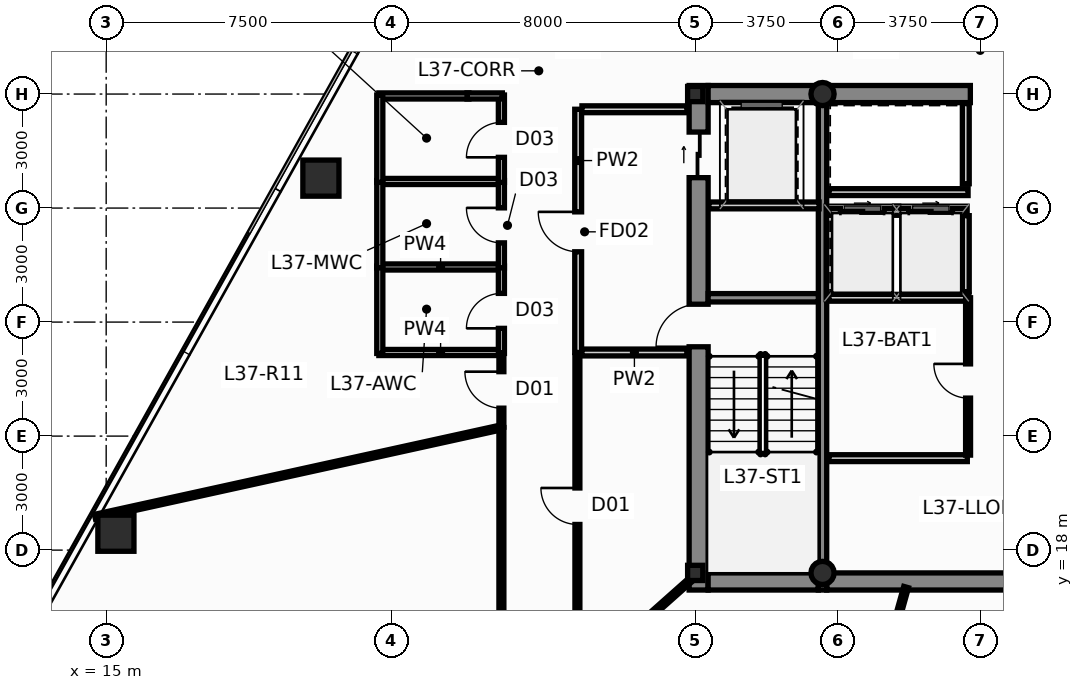
"""IFC4 building model, lengths in metres.
Left out: names, types, materials, properties, quantities, classifications, styles, units other than length and angle.
Written with IfcOpenShell. Run it as: python <this file> out.ifc"""

import sys

from ifc_helpers import new_model, si_unit, direction, frame, frame_2d, origin, origin_2d, place, context, subcontext, project, spatial, rectangle, hollow_rectangle, hollow_circle, i_section, extrude, source, transform, mapped, element, fill, save


model = new_model("IFC4")
c1 = context("Model", 3, precision=1e-05, world=origin(), true_north=direction((0.0, 1.0)))
c2 = subcontext(c1, "Body", "Model", "MODEL_VIEW")
j1 = project(units=[si_unit("LENGTHUNIT", "METRE"), si_unit("PLANEANGLEUNIT", "RADIAN")], contexts=[c1])
p1 = place(None, origin())
s1 = spatial("IfcSite", under=j1, at=p1, CompositionType="ELEMENT")
p2 = place(p1, origin())
s2 = spatial("IfcBuilding", under=s1, at=p2, CompositionType="ELEMENT")
p3 = place(p2, frame((0.0, 0.0, 142.75)))
s3 = spatial("IfcBuildingStorey", under=s2, at=p3, CompositionType="ELEMENT", Elevation=142.75)
m1 = source(origin(), c2, "Body", "SweptSolid", [
    extrude(i_section(OverallWidth=0.4, OverallDepth=0.4, WebThickness=0.02, FlangeThickness=0.032, at=origin_2d()), origin(), (0.0, 0.0, 1.0), 3.65),
])
for number, where, z_axis, x_axis in (
    (1, (30.5, 17.4, 0.0), (0.0, 0.0, 1.0), (1.0, 0.0, 0.0)),
    (2, (30.5, 30.0, 0.0), (0.0, 0.0, 1.0), (1.0, 0.0, 0.0)),
):
    element("IfcColumn", number, at=place(p3, frame(where, z_axis=z_axis, x_axis=x_axis)), inside=s3, PredefinedType="COLUMN", context=c2, shape_type="MappedRepresentation", body=[
        mapped(m1, transform((0.0, 0.0, 0.0), scale=1.0)),
    ])
m2 = source(origin(), c2, "Body", "SweptSolid", [
    extrude(hollow_circle(Radius=0.305, WallThickness=0.025, at=origin_2d()), origin(), (0.0, 0.0, 1.0), 3.65),
])
for number, where, z_axis, x_axis in (
    (3, (33.85, 17.4, 0.0), (0.0, 0.0, 1.0), (1.0, 0.0, 0.0)),
    (4, (33.85, 30.0, 0.0), (0.0, 0.0, 1.0), (1.0, 0.0, 0.0)),
):
    element("IfcColumn", number, at=place(p3, frame(where, z_axis=z_axis, x_axis=x_axis)), inside=s3, PredefinedType="COLUMN", context=c2, shape_type="MappedRepresentation", body=[
        mapped(m2, transform((0.0, 0.0, 0.0), scale=1.0)),
    ])
p4 = place(p3, frame((30.59, 16.95, 0.0), z_axis=(0.0, 0.0, 1.0), x_axis=(0.0, 1.0, 0.0)))
e5 = element("IfcWall", 5, at=p4, inside=s3, PredefinedType="SHEAR", context=c2, shape_type="SweptSolid", body=[
    extrude(rectangle(XDim=13.275, YDim=0.5, at=frame_2d((6.638, 0.0))), origin(), (0.0, 0.0, 1.0), 3.65),
])
p5 = place(p4, frame((6.4, 0.0, 0.0)))
e6 = element("IfcOpeningElement", 6, at=p5, cuts=e5, PredefinedType="OPENING", context=c2, shape_type="SweptSolid", body=[
    extrude(rectangle(XDim=1.12, YDim=2.15, at=frame_2d((0.56, 1.075))), frame((0.0, 0.262, 0.0), z_axis=(0.0, -1.0, 0.0), x_axis=(1.0, 0.0, 0.0)), (0.0, 0.0, 1.0), 0.524),
])
p6 = place(p4, frame((10.85, 0.0, 0.0)))
e7 = element("IfcOpeningElement", 7, at=p6, cuts=e5, PredefinedType="OPENING", context=c2, shape_type="SweptSolid", body=[
    extrude(rectangle(XDim=1.2, YDim=2.2, at=frame_2d((0.6, 1.1))), frame((0.0, 0.262, 0.0), z_axis=(0.0, -1.0, 0.0), x_axis=(1.0, 0.0, 0.0)), (0.0, 0.0, 1.0), 0.524),
])
p7 = place(p3, frame((30.84, 17.175, 0.0), z_axis=(0.0, 0.0, 1.0), x_axis=(1.0, 0.0, 0.0)))
e8 = element("IfcWall", 8, at=p7, inside=s3, PredefinedType="SHEAR", context=c2, shape_type="SweptSolid", body=[
    extrude(rectangle(XDim=2.9, YDim=0.45, at=frame_2d((1.45, 0.0))), origin(), (0.0, 0.0, 1.0), 3.65),
])
p8 = place(p3, frame((33.96, 17.175, 0.0), z_axis=(0.0, 0.0, 1.0), x_axis=(1.0, 0.0, 0.0)))
e9 = element("IfcWall", 9, at=p8, inside=s3, PredefinedType="SHEAR", context=c2, shape_type="SweptSolid", body=[
    extrude(rectangle(XDim=8.08, YDim=0.45, at=frame_2d((4.04, 0.0))), origin(), (0.0, 0.0, 1.0), 3.65),
])
p9 = place(p3, frame((30.84, 30.0, 0.0), z_axis=(0.0, 0.0, 1.0), x_axis=(1.0, 0.0, 0.0)))
e10 = element("IfcWall", 10, at=p9, inside=s3, PredefinedType="SHEAR", context=c2, shape_type="SweptSolid", body=[
    extrude(rectangle(XDim=2.9, YDim=0.45, at=frame_2d((1.45, 0.0))), origin(), (0.0, 0.0, 1.0), 3.65),
])
p10 = place(p3, frame((33.96, 30.0, 0.0), z_axis=(0.0, 0.0, 1.0), x_axis=(1.0, 0.0, 0.0)))
e11 = element("IfcWall", 11, at=p10, inside=s3, PredefinedType="SHEAR", context=c2, shape_type="SweptSolid", body=[
    extrude(rectangle(XDim=3.78, YDim=0.45, at=frame_2d((1.89, 0.0))), origin(), (0.0, 0.0, 1.0), 3.65),
])
p11 = place(p3, frame((33.85, 16.95, 0.0), z_axis=(0.0, 0.0, 1.0), x_axis=(0.0, 1.0, 0.0)))
e12 = element("IfcWall", 12, at=p11, inside=s3, PredefinedType="SHEAR", context=c2, shape_type="SweptSolid", body=[
    extrude(rectangle(XDim=13.275, YDim=0.22, at=frame_2d((6.638, 0.0))), origin(), (0.0, 0.0, 1.0), 3.65),
])
p12 = place(p3, frame((30.84, 24.64, 0.0), z_axis=(0.0, 0.0, 1.0), x_axis=(1.0, 0.0, 0.0)))
e13 = element("IfcWall", 13, at=p12, inside=s3, PredefinedType="SHEAR", context=c2, shape_type="SweptSolid", body=[
    extrude(rectangle(XDim=2.9, YDim=0.22, at=frame_2d((1.45, 0.0))), origin(), (0.0, 0.0, 1.0), 3.65),
])
m3 = source(origin(), c2, "Body", "SweptSolid", [
    extrude(hollow_rectangle(XDim=0.95, YDim=0.95, WallThickness=0.05, at=origin_2d()), origin(), (0.0, 0.0, 1.0), 3.651),
])
p13 = place(p3, frame((20.65, 27.788, 0.0), z_axis=(0.014913313399, -0.013776424037, 0.999793880369), x_axis=(0.678553674548, 0.734550822447, 0.0)))
e14 = element("IfcColumn", 14, at=p13, inside=s3, PredefinedType="COLUMN", context=c2, shape_type="MappedRepresentation", body=[
    mapped(m3, transform((0.0, 0.0, 0.0), scale=1.0)),
])
m4 = source(origin(), c2, "Body", "SweptSolid", [
    extrude(hollow_rectangle(XDim=0.95, YDim=0.95, WallThickness=0.05, at=origin_2d()), origin(), (0.0, 0.0, 1.0), 3.651),
])
p14 = place(p3, frame((15.256, 18.445, 0.0), z_axis=(0.010364917199, -0.021599150033, 0.999712981415), x_axis=(0.901566609123, 0.432640323264, 0.0)))
e15 = element("IfcColumn", 15, at=p14, inside=s3, PredefinedType="COLUMN", context=c2, shape_type="MappedRepresentation", body=[
    mapped(m4, transform((0.0, 0.0, 0.0), scale=1.0)),
])
p15 = place(p3, frame((34.02, 26.9, 0.0), z_axis=(0.0, 0.0, 1.0), x_axis=(1.0, 0.0, 0.0)))
e16 = element("IfcWall", 16, at=p15, inside=s3, PredefinedType="PARTITIONING", context=c2, shape_type="SweptSolid", body=[
    extrude(rectangle(XDim=3.6, YDim=0.18, at=frame_2d((1.8, 0.0))), origin(), (0.0, 0.0, 1.0), 3.4),
])
p16 = place(p15, frame((0.3, 0.0, 0.0)))
e17 = element("IfcOpeningElement", 17, at=p16, cuts=e16, PredefinedType="OPENING", context=c2, shape_type="SweptSolid", body=[
    extrude(rectangle(XDim=1.15, YDim=2.2, at=frame_2d((0.575, 1.1))), frame((0.0, 0.102, 0.0), z_axis=(0.0, -1.0, 0.0), x_axis=(1.0, 0.0, 0.0)), (0.0, 0.0, 1.0), 0.204),
])
p17 = place(p15, frame((2.1, 0.0, 0.0)))
e18 = element("IfcOpeningElement", 18, at=p17, cuts=e16, PredefinedType="OPENING", context=c2, shape_type="SweptSolid", body=[
    extrude(rectangle(XDim=1.15, YDim=2.2, at=frame_2d((0.575, 1.1))), frame((0.0, 0.102, 0.0), z_axis=(0.0, -1.0, 0.0), x_axis=(1.0, 0.0, 0.0)), (0.0, 0.0, 1.0), 0.204),
])
p18 = place(p3, frame((37.62, 24.8, 0.0), z_axis=(0.0, 0.0, 1.0), x_axis=(0.0, 1.0, 0.0)))
e19 = element("IfcWall", 19, at=p18, inside=s3, PredefinedType="PARTITIONING", context=c2, shape_type="SweptSolid", body=[
    extrude(rectangle(XDim=2.0, YDim=0.18, at=frame_2d((1.0, 0.0))), origin(), (0.0, 0.0, 1.0), 3.4),
])
p19 = place(p3, frame((34.02, 24.64, 0.0), z_axis=(0.0, 0.0, 1.0), x_axis=(1.0, 0.0, 0.0)))
e20 = element("IfcWall", 20, at=p19, inside=s3, PredefinedType="PARTITIONING", context=c2, shape_type="SweptSolid", body=[
    extrude(rectangle(XDim=3.68, YDim=0.18, at=frame_2d((1.84, 0.0))), origin(), (0.0, 0.0, 1.0), 3.4),
])
p20 = place(p3, frame((34.02, 27.42, 0.0), z_axis=(0.0, 0.0, 1.0), x_axis=(1.0, 0.0, 0.0)))
e21 = element("IfcWall", 21, at=p20, inside=s3, PredefinedType="PARTITIONING", context=c2, shape_type="SweptSolid", body=[
    extrude(rectangle(XDim=3.66, YDim=0.18, at=frame_2d((1.83, 0.0))), origin(), (0.0, 0.0, 1.0), 3.4),
])
p21 = place(p3, frame((37.62, 27.64, 0.0), z_axis=(0.0, 0.0, 1.0), x_axis=(0.0, 1.0, 0.0)))
e22 = element("IfcWall", 22, at=p21, inside=s3, PredefinedType="PARTITIONING", context=c2, shape_type="SweptSolid", body=[
    extrude(rectangle(XDim=2.11, YDim=0.18, at=frame_2d((1.055, 0.0))), origin(), (0.0, 0.0, 1.0), 3.4),
])
p22 = place(p3, frame((27.42, 23.2, 0.0), z_axis=(0.0, 0.0, 1.0), x_axis=(0.0, 1.0, 0.0)))
e23 = element("IfcWall", 23, at=p22, inside=s3, PredefinedType="PARTITIONING", context=c2, shape_type="SweptSolid", body=[
    extrude(rectangle(XDim=6.4, YDim=0.18, at=frame_2d((3.2, 0.0))), origin(), (0.0, 0.0, 1.0), 3.078),
])
p23 = place(p22, frame((2.65, 0.0, 0.0)))
e24 = element("IfcOpeningElement", 24, at=p23, cuts=e23, PredefinedType="OPENING", context=c2, shape_type="SweptSolid", body=[
    extrude(rectangle(XDim=1.05, YDim=2.15, at=frame_2d((0.525, 1.075))), frame((0.0, 0.102, 0.0), z_axis=(0.0, -1.0, 0.0), x_axis=(1.0, 0.0, 0.0)), (0.0, 0.0, 1.0), 0.204),
])
p24 = place(p3, frame((27.52, 23.2, 0.0), z_axis=(0.0, 0.0, 1.0), x_axis=(1.0, 0.0, 0.0)))
e25 = element("IfcWall", 25, at=p24, inside=s3, PredefinedType="PARTITIONING", context=c2, shape_type="SweptSolid", body=[
    extrude(rectangle(XDim=2.76, YDim=0.18, at=frame_2d((1.38, 0.0))), origin(), (0.0, 0.0, 1.0), 3.4),
])
p25 = place(p3, frame((27.52, 29.6, 0.0), z_axis=(0.0, 0.0, 1.0), x_axis=(1.0, 0.0, 0.0)))
e26 = element("IfcWall", 26, at=p25, inside=s3, PredefinedType="PARTITIONING", context=c2, shape_type="SweptSolid", body=[
    extrude(rectangle(XDim=2.76, YDim=0.18, at=frame_2d((1.38, 0.0))), origin(), (0.0, 0.0, 1.0), 2.925),
])
p26 = place(p3, frame((30.86, 27.07, 0.0), z_axis=(0.0, 0.0, 1.0), x_axis=(1.0, 0.0, 0.0)))
e27 = element("IfcWall", 27, at=p26, inside=s3, PredefinedType="PARTITIONING", context=c2, shape_type="SweptSolid", body=[
    extrude(rectangle(XDim=2.9, YDim=0.18, at=frame_2d((1.45, 0.0))), origin(), (0.0, 0.0, 1.0), 3.4),
])
p27 = place(p3, frame((34.02, 20.42, 0.0), z_axis=(0.0, 0.0, 1.0), x_axis=(1.0, 0.0, 0.0)))
e28 = element("IfcWall", 28, at=p27, inside=s3, PredefinedType="PARTITIONING", context=c2, shape_type="SweptSolid", body=[
    extrude(rectangle(XDim=3.64, YDim=0.18, at=frame_2d((1.82, 0.0))), origin(), (0.0, 0.0, 1.0), 3.4),
])
p28 = place(p3, frame((37.68, 20.5, 0.0), z_axis=(0.0, 0.0, 1.0), x_axis=(0.0, 1.0, 0.0)))
e29 = element("IfcWall", 29, at=p28, inside=s3, PredefinedType="PARTITIONING", context=c2, shape_type="SweptSolid", body=[
    extrude(rectangle(XDim=4.14, YDim=0.13, at=frame_2d((2.07, 0.0))), origin(), (0.0, 0.0, 1.0), 3.4),
])
p29 = place(p28, frame((1.5, 0.0, 0.0)))
e30 = element("IfcOpeningElement", 30, at=p29, cuts=e29, PredefinedType="OPENING", context=c2, shape_type="SweptSolid", body=[
    extrude(rectangle(XDim=0.9, YDim=2.1, at=frame_2d((0.45, 1.05))), frame((0.0, 0.077, 0.0), z_axis=(0.0, -1.0, 0.0), x_axis=(1.0, 0.0, 0.0)), (0.0, 0.0, 1.0), 0.154),
])
for number, where, z_axis, x_axis in (
    (31, (22.175, 23.2, 0.0), (0.0, 0.0, 1.0), (1.0, 0.0, 0.0)),
    (32, (22.175, 25.45, 0.0), (0.0, 0.0, 1.0), (1.0, 0.0, 0.0)),
):
    element("IfcWall", number, at=place(p3, frame(where, z_axis=z_axis, x_axis=x_axis)), inside=s3, PredefinedType="PLUMBINGWALL", context=c2, shape_type="SweptSolid", body=[
        extrude(rectangle(XDim=3.25, YDim=0.16, at=frame_2d((1.625, 0.0))), origin(), (0.0, 0.0, 1.0), 3.4),
    ])
p30 = place(p3, frame((22.175, 27.7, 0.0), z_axis=(0.0, 0.0, 1.0), x_axis=(1.0, 0.0, 0.0)))
e33 = element("IfcWall", 33, at=p30, inside=s3, PredefinedType="PLUMBINGWALL", context=c2, shape_type="SweptSolid", body=[
    extrude(rectangle(XDim=3.25, YDim=0.16, at=frame_2d((1.625, 0.0))), origin(), (0.0, 0.0, 1.0), 2.925),
])
p31 = place(p3, frame((22.175, 29.95, 0.0), z_axis=(0.0, 0.0, 1.0), x_axis=(1.0, 0.0, 0.0)))
e34 = element("IfcWall", 34, at=p31, inside=s3, PredefinedType="PLUMBINGWALL", context=c2, shape_type="SweptSolid", body=[
    extrude(rectangle(XDim=2.37, YDim=0.16, at=frame_2d((1.185, 0.0))), origin(), (0.0, 0.0, 1.0), 3.4),
])
p32 = place(p3, frame((25.4, 23.175, 0.0), z_axis=(0.0, 0.0, 1.0), x_axis=(0.0, 1.0, 0.0)))
e35 = element("IfcWall", 35, at=p32, inside=s3, PredefinedType="PLUMBINGWALL", context=c2, shape_type="SweptSolid", body=[
    extrude(rectangle(XDim=2.3, YDim=0.16, at=frame_2d((1.15, 0.0))), origin(), (0.0, 0.0, 1.0), 3.4),
])
p33 = place(p32, frame((0.66, 0.0, 0.0)))
e36 = element("IfcOpeningElement", 36, at=p33, cuts=e35, PredefinedType="OPENING", context=c2, shape_type="SweptSolid", body=[
    extrude(rectangle(XDim=0.92, YDim=2.1, at=frame_2d((0.46, 1.05))), frame((0.0, 0.092, 0.0), z_axis=(0.0, -1.0, 0.0), x_axis=(1.0, 0.0, 0.0)), (0.0, 0.0, 1.0), 0.184),
])
p34 = place(p3, frame((25.4, 25.425, 0.0), z_axis=(0.0, 0.0, 1.0), x_axis=(0.0, 1.0, 0.0)))
e37 = element("IfcWall", 37, at=p34, inside=s3, PredefinedType="PLUMBINGWALL", context=c2, shape_type="SweptSolid", body=[
    extrude(rectangle(XDim=2.3, YDim=0.16, at=frame_2d((1.15, 0.0))), origin(), (0.0, 0.0, 1.0), 3.078),
])
p35 = place(p34, frame((0.66, 0.0, 0.0)))
e38 = element("IfcOpeningElement", 38, at=p35, cuts=e37, PredefinedType="OPENING", context=c2, shape_type="SweptSolid", body=[
    extrude(rectangle(XDim=0.92, YDim=2.1, at=frame_2d((0.46, 1.05))), frame((0.0, 0.092, 0.0), z_axis=(0.0, -1.0, 0.0), x_axis=(1.0, 0.0, 0.0)), (0.0, 0.0, 1.0), 0.184),
])
p36 = place(p3, frame((25.4, 27.675, 0.0), z_axis=(0.0, 0.0, 1.0), x_axis=(0.0, 1.0, 0.0)))
e39 = element("IfcWall", 39, at=p36, inside=s3, PredefinedType="PLUMBINGWALL", context=c2, shape_type="SweptSolid", body=[
    extrude(rectangle(XDim=2.3, YDim=0.16, at=frame_2d((1.15, 0.0))), origin(), (0.0, 0.0, 1.0), 3.078),
])
p37 = place(p36, frame((0.66, 0.0, 0.0)))
e40 = element("IfcOpeningElement", 40, at=p37, cuts=e39, PredefinedType="OPENING", context=c2, shape_type="SweptSolid", body=[
    extrude(rectangle(XDim=0.92, YDim=2.1, at=frame_2d((0.46, 1.05))), frame((0.0, 0.092, 0.0), z_axis=(0.0, -1.0, 0.0), x_axis=(1.0, 0.0, 0.0)), (0.0, 0.0, 1.0), 0.184),
])
p38 = place(p3, frame((22.2, 25.475, 0.0), z_axis=(0.0, 0.0, 1.0), x_axis=(0.0, -1.0, 0.0)))
e41 = element("IfcWall", 41, at=p38, inside=s3, PredefinedType="PLUMBINGWALL", context=c2, shape_type="SweptSolid", body=[
    extrude(rectangle(XDim=2.3, YDim=0.16, at=frame_2d((1.15, 0.0))), origin(), (0.0, 0.0, 1.0), 3.078),
])
for number, where, z_axis, x_axis in (
    (42, (22.2, 25.425, 0.0), (0.0, 0.0, 1.0), (0.0, 1.0, 0.0)),
    (43, (22.2, 27.675, 0.0), (0.0, 0.0, 1.0), (0.0, 1.0, 0.0)),
):
    element("IfcWall", number, at=place(p3, frame(where, z_axis=z_axis, x_axis=x_axis)), inside=s3, PredefinedType="PLUMBINGWALL", context=c2, shape_type="SweptSolid", body=[
        extrude(rectangle(XDim=2.3, YDim=0.16, at=frame_2d((1.15, 0.0))), origin(), (0.0, 0.0, 1.0), 3.4),
    ])
p39 = place(p3, frame((24.495, 29.95, 0.0), z_axis=(0.0, 0.0, 1.0), x_axis=(1.0, 0.0, 0.0)))
e44 = element("IfcWall", 44, at=p39, inside=s3, PredefinedType="PLUMBINGWALL", context=c2, shape_type="SweptSolid", body=[
    extrude(rectangle(XDim=0.93, YDim=0.16, at=frame_2d((0.465, 0.0))), origin(), (0.0, 0.0, 1.0), 3.4),
])
p40 = place(p3, frame((18.311, 6.5, 0.0), z_axis=(0.0, 0.0, 1.0), x_axis=(0.747588382927, 0.664162336867, 0.0)))
e45 = element("IfcWall", 45, at=p40, inside=s3, PredefinedType="PARTITIONING", context=c2, shape_type="SweptSolid", body=[
    extrude(rectangle(XDim=16.095, YDim=0.13, at=frame_2d((8.048, 0.0))), origin(), (0.0, 0.0, 1.0), 2.925),
])
p41 = place(p40, frame((7.635, 0.0, 0.0)))
e46 = element("IfcOpeningElement", 46, at=p41, cuts=e45, PredefinedType="OPENING", context=c2, shape_type="SweptSolid", body=[
    extrude(rectangle(XDim=0.96, YDim=2.15, at=frame_2d((0.48, 1.075))), frame((0.0, 0.077, 0.0), z_axis=(0.0, -1.0, 0.0), x_axis=(1.0, 0.0, 0.0)), (0.0, 0.0, 1.0), 0.154),
])
p42 = place(p3, frame((33.068, 6.379, 0.0), z_axis=(0.0, 0.0, 1.0), x_axis=(0.269684788435, 0.962948656413, 0.0)))
e47 = element("IfcWall", 47, at=p42, inside=s3, PredefinedType="PARTITIONING", context=c2, shape_type="SweptSolid", body=[
    extrude(rectangle(XDim=11.059, YDim=0.13, at=frame_2d((5.529, 0.0))), origin(), (0.0, 0.0, 1.0), 3.4),
])
p43 = place(p42, frame((5.101, 0.0, 0.0)))
e48 = element("IfcOpeningElement", 48, at=p43, cuts=e47, PredefinedType="OPENING", context=c2, shape_type="SweptSolid", body=[
    extrude(rectangle(XDim=0.96, YDim=2.15, at=frame_2d((0.48, 1.075))), frame((0.0, 0.077, 0.0), z_axis=(0.0, -1.0, 0.0), x_axis=(1.0, 0.0, 0.0)), (0.0, 0.0, 1.0), 0.154),
])
p44 = place(p3, frame((14.704, 18.877, 0.0), z_axis=(0.0, 0.0, 1.0), x_axis=(0.976648210669, 0.21484476395, 0.0)))
e49 = element("IfcWall", 49, at=p44, inside=s3, PredefinedType="PARTITIONING", context=c2, shape_type="SweptSolid", body=[
    extrude(rectangle(XDim=10.947, YDim=0.13, at=frame_2d((5.473, 0.0))), origin(), (0.0, 0.0, 1.0), 3.4),
])
p45 = place(p3, frame((27.4, 15.205, 0.0), z_axis=(0.0, 0.0, 1.0), x_axis=(0.0, 1.0, 0.0)))
e50 = element("IfcWall", 50, at=p45, inside=s3, PredefinedType="PARTITIONING", context=c2, shape_type="SweptSolid", body=[
    extrude(rectangle(XDim=7.9, YDim=0.13, at=frame_2d((3.95, 0.0))), origin(), (0.0, 0.0, 1.0), 3.4),
])
p46 = place(p45, frame((3.47, 0.0, 0.0)))
e51 = element("IfcOpeningElement", 51, at=p46, cuts=e50, PredefinedType="OPENING", context=c2, shape_type="SweptSolid", body=[
    extrude(rectangle(XDim=0.96, YDim=2.15, at=frame_2d((0.48, 1.075))), frame((0.0, 0.077, 0.0), z_axis=(0.0, -1.0, 0.0), x_axis=(1.0, 0.0, 0.0)), (0.0, 0.0, 1.0), 0.154),
])
p47 = place(p3, frame((25.4, 21.225, 0.0), z_axis=(0.0, 0.0, 1.0), x_axis=(0.0, -1.0, 0.0)))
e52 = element("IfcWall", 52, at=p47, inside=s3, PredefinedType="PARTITIONING", context=c2, shape_type="SweptSolid", body=[
    extrude(rectangle(XDim=6.02, YDim=0.13, at=frame_2d((3.01, 0.0))), origin(), (0.0, 0.0, 1.0), 3.078),
])
p48 = place(p3, frame((25.4, 21.235, 0.0), z_axis=(0.0, 0.0, 1.0), x_axis=(0.0, 1.0, 0.0)))
e53 = element("IfcWall", 53, at=p48, inside=s3, PredefinedType="PARTITIONING", context=c2, shape_type="SweptSolid", body=[
    extrude(rectangle(XDim=1.96, YDim=0.13, at=frame_2d((0.98, 0.0))), origin(), (0.0, 0.0, 1.0), 3.4),
])
p49 = place(p48, frame((0.5, 0.0, 0.0)))
e54 = element("IfcOpeningElement", 54, at=p49, cuts=e53, PredefinedType="OPENING", context=c2, shape_type="SweptSolid", body=[
    extrude(rectangle(XDim=0.96, YDim=2.15, at=frame_2d((0.48, 1.075))), frame((0.0, 0.077, 0.0), z_axis=(0.0, -1.0, 0.0), x_axis=(1.0, 0.0, 0.0)), (0.0, 0.0, 1.0), 0.154),
])
p50 = place(p5, origin())
e55 = element("IfcDoor", 55, at=p50, inside=s3, OperationType="SINGLE_SWING_LEFT", PredefinedType="DOOR", context=c2, shape_type="SweptSolid", body=[
    extrude(rectangle(XDim=1.12, YDim=2.15, at=frame_2d((0.56, 1.075))), frame((0.0, 0.025, 0.0), z_axis=(0.0, -1.0, 0.0), x_axis=(1.0, 0.0, 0.0)), (0.0, 0.0, 1.0), 0.05),
])
fill(e6, e55)
p51 = place(p6, origin())
e56 = element("IfcDoor", 56, at=p51, inside=s3, OperationType="SLIDING_TO_LEFT", PredefinedType="DOOR", context=c2, shape_type="SweptSolid", body=[
    extrude(rectangle(XDim=1.2, YDim=2.2, at=frame_2d((0.6, 1.1))), frame((0.0, 0.025, 0.0), z_axis=(0.0, -1.0, 0.0), x_axis=(1.0, 0.0, 0.0)), (0.0, 0.0, 1.0), 0.05),
])
fill(e7, e56)
p52 = place(p16, origin())
e57 = element("IfcDoor", 57, at=p52, inside=s3, OperationType="SLIDING_TO_LEFT", PredefinedType="DOOR", context=c2, shape_type="SweptSolid", body=[
    extrude(rectangle(XDim=1.15, YDim=2.2, at=frame_2d((0.575, 1.1))), frame((0.0, 0.025, 0.0), z_axis=(0.0, -1.0, 0.0), x_axis=(1.0, 0.0, 0.0)), (0.0, 0.0, 1.0), 0.05),
])
fill(e17, e57)
p53 = place(p17, origin())
e58 = element("IfcDoor", 58, at=p53, inside=s3, OperationType="SLIDING_TO_RIGHT", PredefinedType="DOOR", context=c2, shape_type="SweptSolid", body=[
    extrude(rectangle(XDim=1.15, YDim=2.2, at=frame_2d((0.575, 1.1))), frame((0.0, 0.025, 0.0), z_axis=(0.0, -1.0, 0.0), x_axis=(1.0, 0.0, 0.0)), (0.0, 0.0, 1.0), 0.05),
])
fill(e18, e58)
p54 = place(p23, origin())
e59 = element("IfcDoor", 59, at=p54, inside=s3, OperationType="SINGLE_SWING_RIGHT", PredefinedType="DOOR", context=c2, shape_type="SweptSolid", body=[
    extrude(rectangle(XDim=1.05, YDim=2.15, at=frame_2d((0.525, 1.075))), frame((0.0, 0.025, 0.0), z_axis=(0.0, -1.0, 0.0), x_axis=(1.0, 0.0, 0.0)), (0.0, 0.0, 1.0), 0.05),
])
fill(e24, e59)
p55 = place(p29, origin())
e60 = element("IfcDoor", 60, at=p55, inside=s3, OperationType="SINGLE_SWING_RIGHT", PredefinedType="DOOR", context=c2, shape_type="SweptSolid", body=[
    extrude(rectangle(XDim=0.9, YDim=2.1, at=frame_2d((0.45, 1.05))), frame((0.0, 0.025, 0.0), z_axis=(0.0, -1.0, 0.0), x_axis=(1.0, 0.0, 0.0)), (0.0, 0.0, 1.0), 0.05),
])
fill(e30, e60)
p56 = place(p33, origin())
e61 = element("IfcDoor", 61, at=p56, inside=s3, OperationType="SINGLE_SWING_LEFT", PredefinedType="DOOR", context=c2, shape_type="SweptSolid", body=[
    extrude(rectangle(XDim=0.92, YDim=2.1, at=frame_2d((0.46, 1.05))), frame((0.0, 0.025, 0.0), z_axis=(0.0, -1.0, 0.0), x_axis=(1.0, 0.0, 0.0)), (0.0, 0.0, 1.0), 0.05),
])
fill(e36, e61)
p57 = place(p35, origin())
e62 = element("IfcDoor", 62, at=p57, inside=s3, OperationType="SINGLE_SWING_RIGHT", PredefinedType="DOOR", context=c2, shape_type="SweptSolid", body=[
    extrude(rectangle(XDim=0.92, YDim=2.1, at=frame_2d((0.46, 1.05))), frame((0.0, 0.025, 0.0), z_axis=(0.0, -1.0, 0.0), x_axis=(1.0, 0.0, 0.0)), (0.0, 0.0, 1.0), 0.05),
])
fill(e38, e62)
p58 = place(p37, origin())
e63 = element("IfcDoor", 63, at=p58, inside=s3, OperationType="SINGLE_SWING_LEFT", PredefinedType="DOOR", context=c2, shape_type="SweptSolid", body=[
    extrude(rectangle(XDim=0.92, YDim=2.1, at=frame_2d((0.46, 1.05))), frame((0.0, 0.025, 0.0), z_axis=(0.0, -1.0, 0.0), x_axis=(1.0, 0.0, 0.0)), (0.0, 0.0, 1.0), 0.05),
])
fill(e40, e63)
p59 = place(p46, origin())
e64 = element("IfcDoor", 64, at=p59, inside=s3, OperationType="SINGLE_SWING_RIGHT", PredefinedType="DOOR", context=c2, shape_type="SweptSolid", body=[
    extrude(rectangle(XDim=0.96, YDim=2.15, at=frame_2d((0.48, 1.075))), frame((0.0, 0.025, 0.0), z_axis=(0.0, -1.0, 0.0), x_axis=(1.0, 0.0, 0.0)), (0.0, 0.0, 1.0), 0.05),
])
fill(e51, e64)
p60 = place(p49, origin())
e65 = element("IfcDoor", 65, at=p60, inside=s3, OperationType="SINGLE_SWING_RIGHT", PredefinedType="DOOR", context=c2, shape_type="SweptSolid", body=[
    extrude(rectangle(XDim=0.96, YDim=2.15, at=frame_2d((0.48, 1.075))), frame((0.0, 0.025, 0.0), z_axis=(0.0, -1.0, 0.0), x_axis=(1.0, 0.0, 0.0)), (0.0, 0.0, 1.0), 0.05),
])
fill(e54, e65)
save(model, sys.argv[1])
